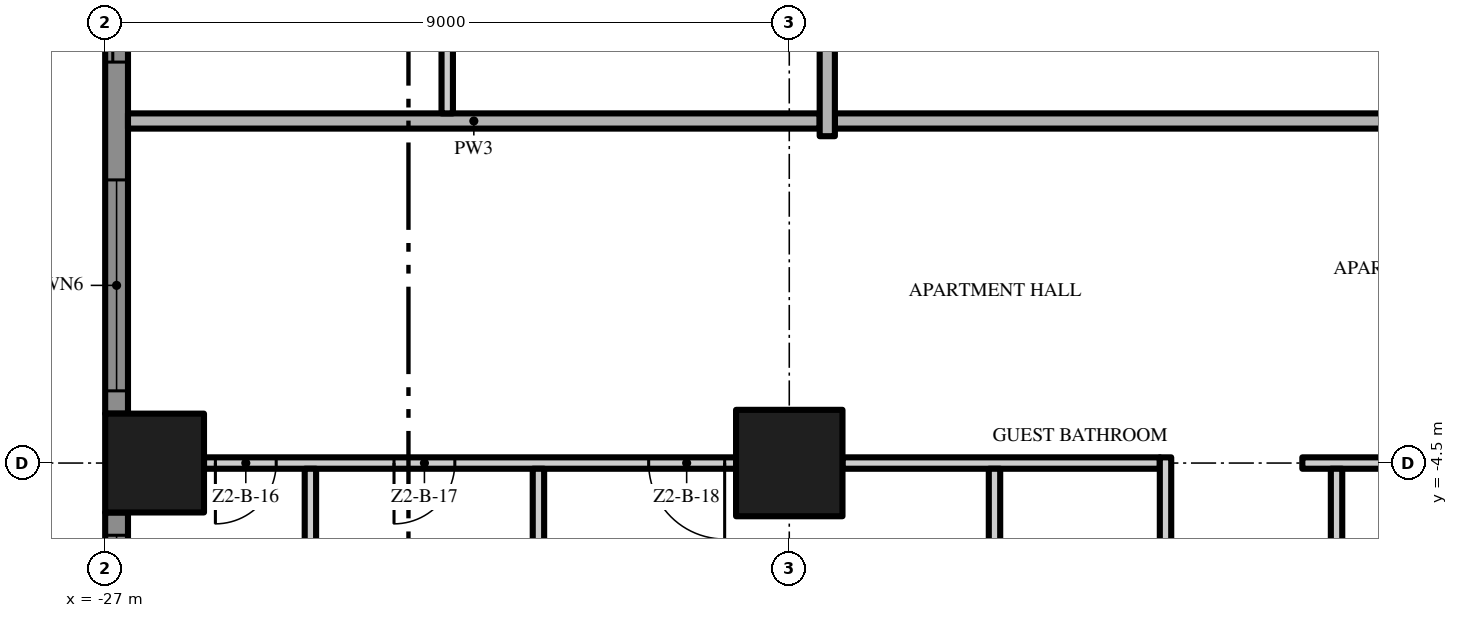
"""IFC4 building model, lengths in metres.
Left out: names, types, materials, properties, quantities, classifications, styles, units other than length and angle.
Written with IfcOpenShell. Run it as: python <this file> out.ifc"""

import sys

from ifc_helpers import new_model, si_unit, direction, frame, frame_2d, origin, origin_2d, place, context, subcontext, project, spatial, polyline, rectangle, outline, extrude, element, fill, save


model = new_model("IFC4")
c1 = context("Model", 3, precision=1e-05, world=origin(), true_north=direction((0.0, 1.0)))
c2 = subcontext(c1, "Body", "Model", "MODEL_VIEW")
j1 = project(units=[si_unit("LENGTHUNIT", "METRE"), si_unit("PLANEANGLEUNIT", "RADIAN")], contexts=[c1])
p1 = place(None, origin())
s1 = spatial("IfcSite", under=j1, at=p1, CompositionType="ELEMENT")
p2 = place(p1, origin())
s2 = spatial("IfcBuilding", under=s1, at=p2, CompositionType="ELEMENT")
p3 = place(p2, frame((0.0, 0.0, 80.8)))
s3 = spatial("IfcBuildingStorey", under=s2, at=p3, CompositionType="ELEMENT", Elevation=80.8)
p4 = place(p3, frame((-18.0, -4.5, 0.0), z_axis=(0.0, 0.0, 1.0), x_axis=(1.0, 0.0, 0.0)))
e1 = element("IfcColumn", 1, at=p4, inside=s3, PredefinedType="COLUMN", context=c2, shape_type="SweptSolid", body=[
    extrude(rectangle(XDim=1.4, YDim=1.4, at=origin_2d()), origin(), (0.0, 0.0, 1.0), 3.5),
])
p5 = place(p3, frame((-26.35, -4.5, 0.0), z_axis=(0.0, 0.0, 1.0), x_axis=(1.0, 0.0, 0.0)))
e2 = element("IfcColumn", 2, at=p5, inside=s3, PredefinedType="COLUMN", context=c2, shape_type="SweptSolid", body=[
    extrude(rectangle(XDim=1.3, YDim=1.3, at=origin_2d()), origin(), (0.0, 0.0, 1.0), 3.5),
])
p6 = place(p3, frame((-26.85, -3.85, 0.0), z_axis=(0.0, 0.0, 1.0), x_axis=(0.0, 1.0, 0.0)))
e3 = element("IfcWall", 3, at=p6, inside=s3, PredefinedType="SOLIDWALL", context=c2, shape_type="SweptSolid", body=[
    extrude(rectangle(XDim=7.7, YDim=0.3, at=frame_2d((3.85, 0.0))), origin(), (0.0, 0.0, 1.0), 3.5),
])
p7 = place(p6, frame((4.625, 0.0, 0.0)))
e4 = element("IfcOpeningElement", 4, at=p7, cuts=e3, PredefinedType="OPENING", context=c2, shape_type="SweptSolid", body=[
    extrude(rectangle(XDim=2.775, YDim=2.4, at=frame_2d((1.387, 1.2))), frame((0.0, 0.16, 0.0), z_axis=(0.0, -1.0, 0.0), x_axis=(1.0, 0.0, 0.0)), (0.0, 0.0, 1.0), 0.32),
])
p8 = place(p6, frame((0.3, 0.0, 0.45)))
e5 = element("IfcOpeningElement", 5, at=p8, cuts=e3, PredefinedType="OPENING", context=c2, shape_type="SweptSolid", body=[
    extrude(rectangle(XDim=2.775, YDim=2.65, at=frame_2d((1.387, 1.325))), frame((0.0, 0.16, 0.0), z_axis=(0.0, -1.0, 0.0), x_axis=(1.0, 0.0, 0.0)), (0.0, 0.0, 1.0), 0.32),
])
p9 = place(p3, frame((-26.85, -12.85, 0.0), z_axis=(0.0, 0.0, 1.0), x_axis=(0.0, 1.0, 0.0)))
e6 = element("IfcWall", 6, at=p9, inside=s3, PredefinedType="SOLIDWALL", context=c2, shape_type="SweptSolid", body=[
    extrude(rectangle(XDim=7.7, YDim=0.3, at=frame_2d((3.85, 0.0))), origin(), (0.0, 0.0, 1.0), 3.5),
])
p10 = place(p9, frame((4.625, 0.0, 0.45)))
e7 = element("IfcOpeningElement", 7, at=p10, cuts=e6, PredefinedType="OPENING", context=c2, shape_type="SweptSolid", body=[
    extrude(rectangle(XDim=2.775, YDim=2.65, at=frame_2d((1.387, 1.325))), frame((0.0, 0.16, 0.0), z_axis=(0.0, -1.0, 0.0), x_axis=(1.0, 0.0, 0.0)), (0.0, 0.0, 1.0), 0.32),
])
p11 = place(p9, frame((0.3, 0.0, 0.0)))
e8 = element("IfcOpeningElement", 8, at=p11, cuts=e6, PredefinedType="OPENING", context=c2, shape_type="SweptSolid", body=[
    extrude(rectangle(XDim=2.775, YDim=2.4, at=frame_2d((1.387, 1.2))), frame((0.0, 0.16, 0.0), z_axis=(0.0, -1.0, 0.0), x_axis=(1.0, 0.0, 0.0)), (0.0, 0.0, 1.0), 0.32),
])
p12 = place(p3, origin())
e9 = element("IfcWall", 9, at=p12, inside=s3, PredefinedType="USERDEFINED", context=c2, shape_type="SweptSolid", body=[
    extrude(outline(polyline([(-29.649, 18.0), (-29.985, 16.5), (-30.0, 16.125), (-29.869, 15.0), (-29.345, 13.5), (-28.612, 12.0), (-27.951, 10.5), (-27.615, 9.0), (-27.6, 8.625), (-27.731, 7.5), (-28.255, 6.0), (-28.988, 4.5), (-29.649, 3.0), (-29.985, 1.5), (-30.0, 1.125), (-29.869, 0.0), (-29.345, -1.5), (-28.612, -3.0), (-27.951, -4.5), (-27.615, -6.0), (-27.6, -6.375), (-27.731, -7.5), (-28.255, -9.0), (-28.988, -10.5), (-29.649, -12.0), (-29.985, -13.5), (-30.0, -13.875), (-29.869, -15.0), (-29.345, -16.5), (-28.612, -18.0), (-28.388, -17.89), (-29.114, -16.404), (-29.624, -14.944), (-29.749, -13.865), (-29.736, -13.533), (-29.41, -12.079), (-28.761, -10.605), (-28.024, -9.096), (-27.486, -7.556), (-27.349, -6.385), (-27.366, -5.967), (-27.713, -4.421), (-28.385, -2.895), (-29.114, -1.404), (-29.624, 0.056), (-29.749, 1.135), (-29.736, 1.467), (-29.41, 2.921), (-28.761, 4.395), (-28.024, 5.904), (-27.486, 7.444), (-27.349, 8.615), (-27.366, 9.033), (-27.713, 10.579), (-28.385, 12.105), (-29.114, 13.596), (-29.624, 15.056), (-29.749, 16.135), (-29.736, 16.467), (-29.405, 17.945), (-29.649, 18.0)])), origin(), (0.0, 0.0, 1.0), 0.9),
])
p13 = place(p3, frame((-18.7, -4.5, 0.0), z_axis=(0.0, 0.0, 1.0), x_axis=(-1.0, 0.0, 0.0)))
e10 = element("IfcWall", 10, at=p13, inside=s3, PredefinedType="PARTITIONING", context=c2, shape_type="SweptSolid", body=[
    extrude(rectangle(XDim=7.0, YDim=0.15, at=frame_2d((3.5, 0.0))), origin(), (0.0, 0.0, 1.0), 3.5),
])
p14 = place(p13, frame((6.05, 0.0, 0.0)))
e11 = element("IfcOpeningElement", 11, at=p14, cuts=e10, PredefinedType="OPENING", context=c2, shape_type="SweptSolid", body=[
    extrude(rectangle(XDim=0.8, YDim=2.0, at=frame_2d((0.4, 1.0))), frame((0.0, 0.085, 0.0), z_axis=(0.0, -1.0, 0.0), x_axis=(1.0, 0.0, 0.0)), (0.0, 0.0, 1.0), 0.17),
])
p15 = place(p13, frame((3.7, 0.0, 0.0)))
e12 = element("IfcOpeningElement", 12, at=p15, cuts=e10, PredefinedType="OPENING", context=c2, shape_type="SweptSolid", body=[
    extrude(rectangle(XDim=0.8, YDim=2.0, at=frame_2d((0.4, 1.0))), frame((0.0, 0.085, 0.0), z_axis=(0.0, -1.0, 0.0), x_axis=(1.0, 0.0, 0.0)), (0.0, 0.0, 1.0), 0.17),
])
p16 = place(p13, frame((0.15, 0.0, 0.0)))
e13 = element("IfcOpeningElement", 13, at=p16, cuts=e10, PredefinedType="OPENING", context=c2, shape_type="SweptSolid", body=[
    extrude(rectangle(XDim=1.0, YDim=2.4, at=frame_2d((0.5, 1.2))), frame((0.0, 0.085, 0.0), z_axis=(0.0, -1.0, 0.0), x_axis=(1.0, 0.0, 0.0)), (0.0, 0.0, 1.0), 0.17),
])
p17 = place(p3, frame((-17.3, -4.5, 0.0), z_axis=(0.0, 0.0, 1.0), x_axis=(1.0, 0.0, 0.0)))
e14 = element("IfcWall", 14, at=p17, inside=s3, PredefinedType="PARTITIONING", context=c2, shape_type="SweptSolid", body=[
    extrude(rectangle(XDim=4.175, YDim=0.15, at=frame_2d((2.087, 0.0))), origin(), (0.0, 0.0, 1.0), 3.5),
])
p18 = place(p3, frame((-11.25, -4.5, 0.0), z_axis=(0.0, 0.0, 1.0), x_axis=(1.0, 0.0, 0.0)))
e15 = element("IfcWall", 15, at=p18, inside=s3, PredefinedType="PARTITIONING", context=c2, shape_type="SweptSolid", body=[
    extrude(rectangle(XDim=1.55, YDim=0.15, at=frame_2d((0.775, 0.0))), origin(), (0.0, 0.0, 1.0), 3.5),
])
p19 = place(p3, frame((-0.1, 0.0, 0.0), z_axis=(0.0, 0.0, 1.0), x_axis=(-1.0, 0.0, 0.0)))
e16 = element("IfcWall", 16, at=p19, inside=s3, PredefinedType="PARTITIONING", context=c2, shape_type="SweptSolid", body=[
    extrude(rectangle(XDim=17.3, YDim=0.2, at=frame_2d((8.65, 0.0))), origin(), (0.0, 0.0, 1.0), 3.5),
])
p20 = place(p19, frame((8.15, 0.0, 0.0)))
e17 = element("IfcOpeningElement", 17, at=p20, cuts=e16, PredefinedType="OPENING", context=c2, shape_type="SweptSolid", body=[
    extrude(rectangle(XDim=1.5, YDim=2.4, at=frame_2d((0.75, 1.2))), frame((0.0, 0.11, 0.0), z_axis=(0.0, -1.0, 0.0), x_axis=(1.0, 0.0, 0.0)), (0.0, 0.0, 1.0), 0.22),
])
p21 = place(p3, frame((-26.7, 0.0, 0.0), z_axis=(0.0, 0.0, 1.0), x_axis=(1.0, 0.0, 0.0)))
e18 = element("IfcWall", 18, at=p21, inside=s3, PredefinedType="PARTITIONING", context=c2, shape_type="SweptSolid", body=[
    extrude(rectangle(XDim=9.1, YDim=0.2, at=frame_2d((4.55, 0.0))), origin(), (0.0, 0.0, 1.0), 3.5),
])
p22 = place(p3, frame((-24.3, -8.925, 0.0), z_axis=(0.0, 0.0, 1.0), x_axis=(0.0, 1.0, 0.0)))
e19 = element("IfcWall", 19, at=p22, inside=s3, PredefinedType="PARTITIONING", context=c2, shape_type="SweptSolid", body=[
    extrude(rectangle(XDim=4.35, YDim=0.15, at=frame_2d((2.175, 0.0))), origin(), (0.0, 0.0, 1.0), 3.5),
])
p23 = place(p3, frame((-22.5, 0.1, 0.0), z_axis=(0.0, 0.0, 1.0), x_axis=(0.0, 1.0, 0.0)))
e20 = element("IfcWall", 20, at=p23, inside=s3, PredefinedType="PARTITIONING", context=c2, shape_type="SweptSolid", body=[
    extrude(rectangle(XDim=17.25, YDim=0.15, at=frame_2d((8.625, 0.0))), origin(), (0.0, 0.0, 1.0), 3.5),
])
p24 = place(p23, frame((1.65, 0.0, 0.0)))
e21 = element("IfcOpeningElement", 21, at=p24, cuts=e20, PredefinedType="OPENING", context=c2, shape_type="SweptSolid", body=[
    extrude(rectangle(XDim=1.0, YDim=2.4, at=frame_2d((0.5, 1.2))), frame((0.0, 0.085, 0.0), z_axis=(0.0, -1.0, 0.0), x_axis=(1.0, 0.0, 0.0)), (0.0, 0.0, 1.0), 0.17),
])
p25 = place(p23, frame((5.0, 0.0, 0.0)))
e22 = element("IfcOpeningElement", 22, at=p25, cuts=e20, PredefinedType="OPENING", context=c2, shape_type="SweptSolid", body=[
    extrude(rectangle(XDim=1.0, YDim=2.4, at=frame_2d((0.5, 1.2))), frame((0.0, 0.085, 0.0), z_axis=(0.0, -1.0, 0.0), x_axis=(1.0, 0.0, 0.0)), (0.0, 0.0, 1.0), 0.17),
])
p26 = place(p23, frame((11.75, 0.0, 0.0)))
e23 = element("IfcOpeningElement", 23, at=p26, cuts=e20, PredefinedType="OPENING", context=c2, shape_type="SweptSolid", body=[
    extrude(rectangle(XDim=1.0, YDim=2.4, at=frame_2d((0.5, 1.2))), frame((0.0, 0.085, 0.0), z_axis=(0.0, -1.0, 0.0), x_axis=(1.0, 0.0, 0.0)), (0.0, 0.0, 1.0), 0.17),
])
p27 = place(p23, frame((16.1, 0.0, 0.0)))
e24 = element("IfcOpeningElement", 24, at=p27, cuts=e20, PredefinedType="OPENING", context=c2, shape_type="SweptSolid", body=[
    extrude(rectangle(XDim=1.0, YDim=2.4, at=frame_2d((0.5, 1.2))), frame((0.0, 0.085, 0.0), z_axis=(0.0, -1.0, 0.0), x_axis=(1.0, 0.0, 0.0)), (0.0, 0.0, 1.0), 0.17),
])
p28 = place(p3, frame((-21.3, -8.925, 0.0), z_axis=(0.0, 0.0, 1.0), x_axis=(0.0, 1.0, 0.0)))
e25 = element("IfcWall", 25, at=p28, inside=s3, PredefinedType="PARTITIONING", context=c2, shape_type="SweptSolid", body=[
    extrude(rectangle(XDim=4.35, YDim=0.15, at=frame_2d((2.175, 0.0))), origin(), (0.0, 0.0, 1.0), 3.5),
])
p29 = place(p3, frame((-17.5, -0.2, 0.0), z_axis=(0.0, 0.0, 1.0), x_axis=(0.0, 1.0, 0.0)))
e26 = element("IfcWall", 26, at=p29, inside=s3, PredefinedType="PARTITIONING", context=c2, shape_type="SweptSolid", body=[
    extrude(rectangle(XDim=4.0, YDim=0.2, at=frame_2d((2.0, 0.0))), origin(), (0.0, 0.0, 1.0), 3.5),
])
p30 = place(p3, frame((-15.3, -8.925, 0.0), z_axis=(0.0, 0.0, 1.0), x_axis=(0.0, 1.0, 0.0)))
e27 = element("IfcWall", 27, at=p30, inside=s3, PredefinedType="PARTITIONING", context=c2, shape_type="SweptSolid", body=[
    extrude(rectangle(XDim=4.35, YDim=0.15, at=frame_2d((2.175, 0.0))), origin(), (0.0, 0.0, 1.0), 3.5),
])
p31 = place(p3, frame((-13.05, -9.075, 0.0), z_axis=(0.0, 0.0, 1.0), x_axis=(0.0, 1.0, 0.0)))
e28 = element("IfcWall", 28, at=p31, inside=s3, PredefinedType="PARTITIONING", context=c2, shape_type="SweptSolid", body=[
    extrude(rectangle(XDim=4.65, YDim=0.15, at=frame_2d((2.325, 0.0))), origin(), (0.0, 0.0, 1.0), 3.5),
])
p32 = place(p31, frame((1.875, 0.0, 0.0)))
e29 = element("IfcOpeningElement", 29, at=p32, cuts=e28, PredefinedType="OPENING", context=c2, shape_type="SweptSolid", body=[
    extrude(rectangle(XDim=0.9, YDim=2.1, at=frame_2d((0.45, 1.05))), frame((0.0, 0.085, 0.0), z_axis=(0.0, -1.0, 0.0), x_axis=(1.0, 0.0, 0.0)), (0.0, 0.0, 1.0), 0.17),
])
p33 = place(p3, frame((-10.8, -9.075, 0.0), z_axis=(0.0, 0.0, 1.0), x_axis=(0.0, 1.0, 0.0)))
e30 = element("IfcWall", 30, at=p33, inside=s3, PredefinedType="PARTITIONING", context=c2, shape_type="SweptSolid", body=[
    extrude(rectangle(XDim=4.5, YDim=0.15, at=frame_2d((2.25, 0.0))), origin(), (0.0, 0.0, 1.0), 3.5),
])
p34 = place(p7, origin())
e31 = element("IfcDoor", 31, at=p34, inside=s3, OperationType="SINGLE_SWING_LEFT", PredefinedType="DOOR", context=c2, shape_type="SweptSolid", body=[
    extrude(rectangle(XDim=2.775, YDim=2.4, at=frame_2d((1.387, 1.2))), frame((0.0, 0.025, 0.0), z_axis=(0.0, -1.0, 0.0), x_axis=(1.0, 0.0, 0.0)), (0.0, 0.0, 1.0), 0.05),
])
fill(e4, e31)
p35 = place(p8, origin())
e32 = element("IfcWindow", 32, at=p35, inside=s3, PartitioningType="SINGLE_PANEL", PredefinedType="WINDOW", context=c2, shape_type="SweptSolid", body=[
    extrude(rectangle(XDim=2.775, YDim=2.65, at=frame_2d((1.387, 1.325))), frame((0.0, 0.03, 0.0), z_axis=(0.0, -1.0, 0.0), x_axis=(1.0, 0.0, 0.0)), (0.0, 0.0, 1.0), 0.06),
])
fill(e5, e32)
p36 = place(p10, origin())
e33 = element("IfcWindow", 33, at=p36, inside=s3, PartitioningType="SINGLE_PANEL", PredefinedType="WINDOW", context=c2, shape_type="SweptSolid", body=[
    extrude(rectangle(XDim=2.775, YDim=2.65, at=frame_2d((1.387, 1.325))), frame((0.0, 0.03, 0.0), z_axis=(0.0, -1.0, 0.0), x_axis=(1.0, 0.0, 0.0)), (0.0, 0.0, 1.0), 0.06),
])
fill(e7, e33)
p37 = place(p14, origin())
e34 = element("IfcDoor", 34, at=p37, inside=s3, OperationType="SINGLE_SWING_RIGHT", PredefinedType="DOOR", context=c2, shape_type="SweptSolid", body=[
    extrude(rectangle(XDim=0.8, YDim=2.0, at=frame_2d((0.4, 1.0))), frame((0.0, 0.025, 0.0), z_axis=(0.0, -1.0, 0.0), x_axis=(1.0, 0.0, 0.0)), (0.0, 0.0, 1.0), 0.05),
])
fill(e11, e34)
p38 = place(p15, origin())
e35 = element("IfcDoor", 35, at=p38, inside=s3, OperationType="SINGLE_SWING_RIGHT", PredefinedType="DOOR", context=c2, shape_type="SweptSolid", body=[
    extrude(rectangle(XDim=0.8, YDim=2.0, at=frame_2d((0.4, 1.0))), frame((0.0, 0.025, 0.0), z_axis=(0.0, -1.0, 0.0), x_axis=(1.0, 0.0, 0.0)), (0.0, 0.0, 1.0), 0.05),
])
fill(e12, e35)
p39 = place(p16, origin())
e36 = element("IfcDoor", 36, at=p39, inside=s3, OperationType="SINGLE_SWING_LEFT", PredefinedType="DOOR", context=c2, shape_type="SweptSolid", body=[
    extrude(rectangle(XDim=1.0, YDim=2.4, at=frame_2d((0.5, 1.2))), frame((0.0, 0.025, 0.0), z_axis=(0.0, -1.0, 0.0), x_axis=(1.0, 0.0, 0.0)), (0.0, 0.0, 1.0), 0.05),
])
fill(e13, e36)
save(model, sys.argv[1])
